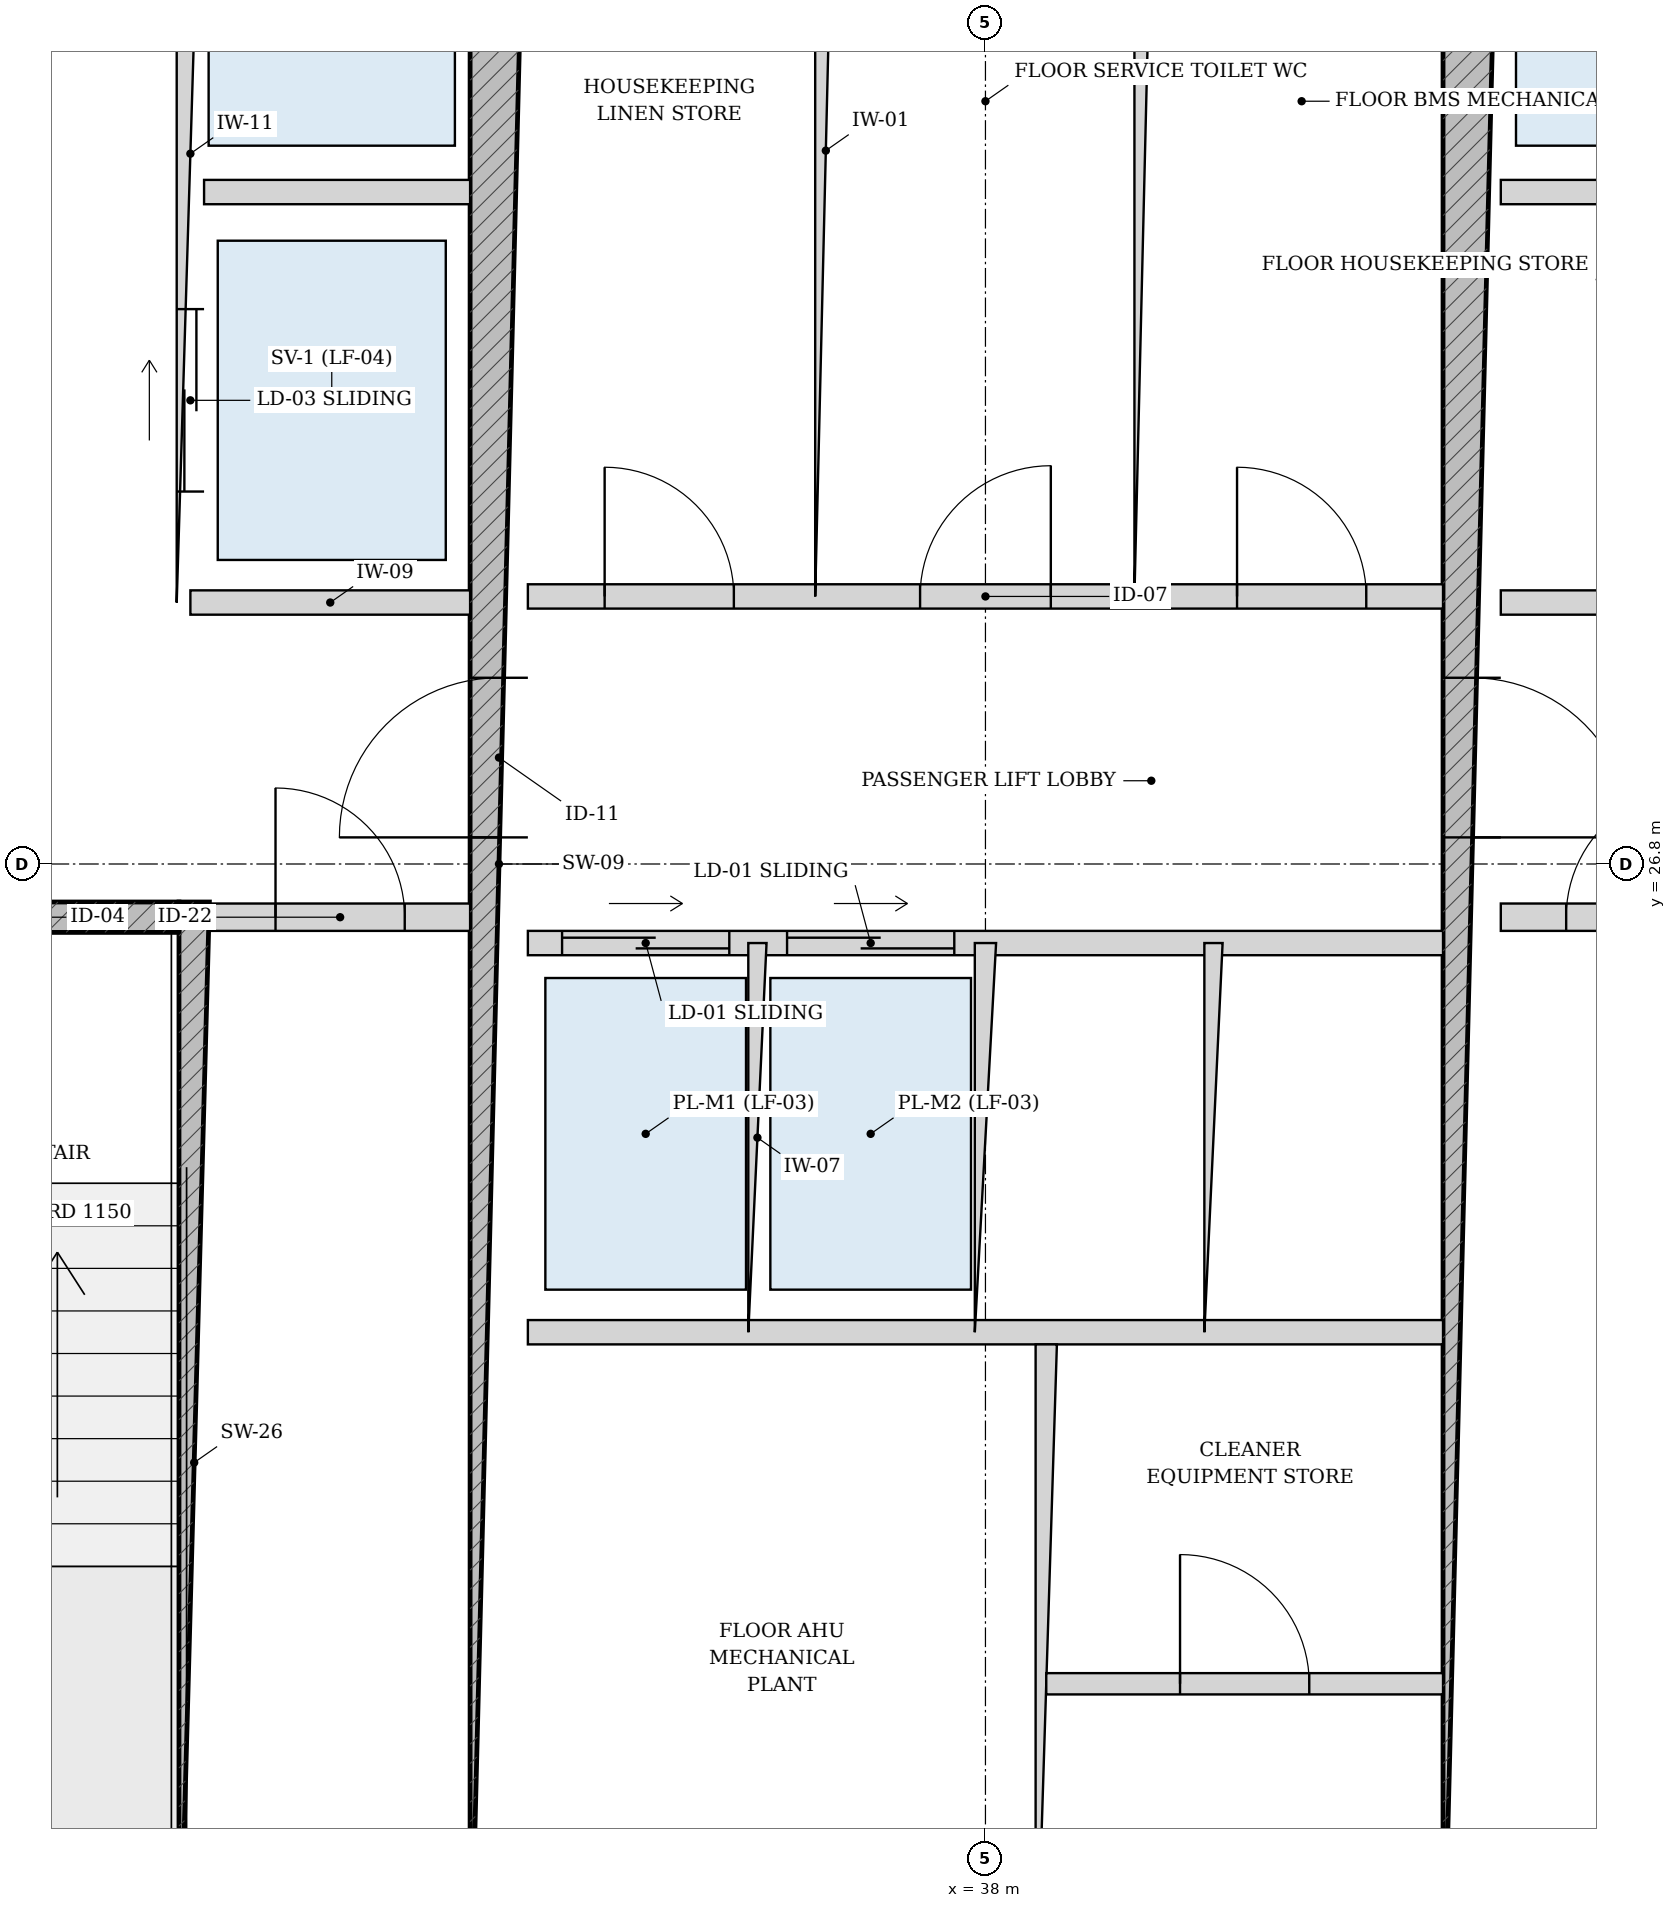
"""IFC4 building model, lengths in metres.
Left out: names, types, materials, properties, quantities, classifications, styles, units other than length and angle.
Written with IfcOpenShell. Run it as: python <this file> out.ifc"""

import sys

from ifc_helpers import new_model, si_unit, direction, frame, frame_2d, origin, place, context, subcontext, project, spatial, rectangle, extrude, source, transform, mapped, element, fill, save


model = new_model("IFC4")
c1 = context("Model", 3, precision=1e-05, world=origin(), true_north=direction((-0.2419218956, 0.970295726276)))
c2 = subcontext(c1, "Body", "Model", "MODEL_VIEW")
j1 = project(units=[si_unit("LENGTHUNIT", "METRE"), si_unit("PLANEANGLEUNIT", "RADIAN")], contexts=[c1])
p1 = place(None, origin())
s1 = spatial("IfcSite", under=j1, at=p1, CompositionType="ELEMENT")
p2 = place(p1, origin())
s2 = spatial("IfcBuilding", under=s1, at=p2, CompositionType="ELEMENT")
p3 = place(p2, frame((0.0, 0.0, 178.6)))
s3 = spatial("IfcBuildingStorey", under=s2, at=p3, CompositionType="ELEMENT", Elevation=178.6)
p4 = place(p3, frame((32.795, 19.175, 0.0), z_axis=(0.0, 0.0, 1.0), x_axis=(0.0, 1.0, 0.0)))
e1 = element("IfcWall", 1, at=p4, inside=s3, PredefinedType="SOLIDWALL", context=c2, shape_type="SweptSolid", body=[
    extrude(rectangle(XDim=7.375, YDim=0.2, at=frame_2d((3.688, 0.0))), origin(), (0.0, 0.0, 1.0), 3.33),
])
p5 = place(p3, frame((29.375, 26.45, 0.0), z_axis=(0.0, 0.0, 1.0), x_axis=(1.0, 0.0, 0.0)))
e2 = element("IfcWall", 2, at=p5, inside=s3, PredefinedType="SOLIDWALL", context=c2, shape_type="SweptSolid", body=[
    extrude(rectangle(XDim=3.32, YDim=0.2, at=frame_2d((1.66, 0.0))), origin(), (0.0, 0.0, 1.0), 3.33),
])
p6 = place(p5, frame((1.185, 0.0, 0.0)))
e3 = element("IfcOpeningElement", 3, at=p6, cuts=e2, PredefinedType="OPENING", context=c2, shape_type="SweptSolid", body=[
    extrude(rectangle(XDim=0.95, YDim=2.15, at=frame_2d((0.475, 1.075))), frame((0.0, 0.11, 0.0), z_axis=(0.0, -1.0, 0.0), x_axis=(1.0, 0.0, 0.0)), (0.0, 0.0, 1.0), 0.22),
])
p7 = place(p3, frame((34.8, 19.175, 0.0), z_axis=(0.0, 0.0, 1.0), x_axis=(0.0, 1.0, 0.0)))
e4 = element("IfcWall", 4, at=p7, inside=s3, PredefinedType="SHEAR", context=c2, shape_type="SweptSolid", body=[
    extrude(rectangle(XDim=15.25, YDim=0.38, at=frame_2d((7.625, 0.0))), origin(), (0.0, 0.0, 1.0), 3.33),
])
p8 = place(p7, frame((7.8, 0.0, 0.0)))
e5 = element("IfcOpeningElement", 5, at=p8, cuts=e4, PredefinedType="OPENING", context=c2, shape_type="SweptSolid", body=[
    extrude(rectangle(XDim=1.05, YDim=2.15, at=frame_2d((0.525, 1.075))), frame((0.0, 0.2, 0.0), z_axis=(0.0, -1.0, 0.0), x_axis=(1.0, 0.0, 0.0)), (0.0, 0.0, 1.0), 0.4),
])
p9 = place(p3, frame((41.2, 19.175, 0.0), z_axis=(0.0, 0.0, 1.0), x_axis=(0.0, 1.0, 0.0)))
e6 = element("IfcWall", 6, at=p9, inside=s3, PredefinedType="SHEAR", context=c2, shape_type="SweptSolid", body=[
    extrude(rectangle(XDim=15.25, YDim=0.38, at=frame_2d((7.625, 0.0))), origin(), (0.0, 0.0, 1.0), 3.33),
])
p10 = place(p9, frame((7.8, 0.0, 0.0)))
e7 = element("IfcOpeningElement", 7, at=p10, cuts=e6, PredefinedType="OPENING", context=c2, shape_type="SweptSolid", body=[
    extrude(rectangle(XDim=1.05, YDim=2.15, at=frame_2d((0.525, 1.075))), frame((0.0, 0.2, 0.0), z_axis=(0.0, -1.0, 0.0), x_axis=(1.0, 0.0, 0.0)), (0.0, 0.0, 1.0), 0.4),
])
p11 = place(p3, frame((32.9, 26.45, 0.0), z_axis=(0.0, 0.0, 1.0), x_axis=(1.0, 0.0, 0.0)))
e8 = element("IfcWall", 8, at=p11, inside=s3, PredefinedType="PARTITIONING", context=c2, shape_type="SweptSolid", body=[
    extrude(rectangle(XDim=1.71, YDim=0.18, at=frame_2d((0.855, 0.0))), origin(), (0.0, 0.0, 1.0), 3.33),
])
p12 = place(p11, frame((0.43, 0.0, 0.0)))
e9 = element("IfcOpeningElement", 9, at=p12, cuts=e8, PredefinedType="OPENING", context=c2, shape_type="SweptSolid", body=[
    extrude(rectangle(XDim=0.85, YDim=2.1, at=frame_2d((0.425, 1.05))), frame((0.0, 0.1, 0.0), z_axis=(0.0, -1.0, 0.0), x_axis=(1.0, 0.0, 0.0)), (0.0, 0.0, 1.0), 0.2),
])
p13 = place(p3, frame((41.39, 26.45, 0.0), z_axis=(0.0, 0.0, 1.0), x_axis=(1.0, 0.0, 0.0)))
e10 = element("IfcWall", 10, at=p13, inside=s3, PredefinedType="PARTITIONING", context=c2, shape_type="SweptSolid", body=[
    extrude(rectangle(XDim=1.71, YDim=0.18, at=frame_2d((0.855, 0.0))), origin(), (0.0, 0.0, 1.0), 3.33),
])
p14 = place(p13, frame((0.43, 0.0, 0.0)))
e11 = element("IfcOpeningElement", 11, at=p14, cuts=e10, PredefinedType="OPENING", context=c2, shape_type="SweptSolid", body=[
    extrude(rectangle(XDim=0.85, YDim=2.1, at=frame_2d((0.425, 1.05))), frame((0.0, 0.1, 0.0), z_axis=(0.0, -1.0, 0.0), x_axis=(1.0, 0.0, 0.0)), (0.0, 0.0, 1.0), 0.2),
])
p15 = place(p3, frame((32.77, 28.52, 0.0), z_axis=(0.0, 0.0, 1.0), x_axis=(0.0, 1.0, 0.0)))
e12 = element("IfcWall", 12, at=p15, inside=s3, PredefinedType="PARTITIONING", context=c2, shape_type="SweptSolid", body=[
    extrude(rectangle(XDim=5.905, YDim=0.18, at=frame_2d((2.953, 0.0))), origin(), (0.0, 0.0, 1.0), 3.33),
])
p16 = place(p15, frame((3.655, 0.0, 0.0)))
e13 = element("IfcOpeningElement", 13, at=p16, cuts=e12, PredefinedType="OPENING", context=c2, shape_type="SweptSolid", body=[
    extrude(rectangle(XDim=1.15, YDim=2.2, at=frame_2d((0.575, 1.1))), frame((0.0, 0.1, 0.0), z_axis=(0.0, -1.0, 0.0), x_axis=(1.0, 0.0, 0.0)), (0.0, 0.0, 1.0), 0.2),
])
p17 = place(p15, frame((0.73, 0.0, 0.0)))
e14 = element("IfcOpeningElement", 14, at=p17, cuts=e12, PredefinedType="OPENING", context=c2, shape_type="SweptSolid", body=[
    extrude(rectangle(XDim=1.2, YDim=2.25, at=frame_2d((0.6, 1.125))), frame((0.0, 0.1, 0.0), z_axis=(0.0, -1.0, 0.0), x_axis=(1.0, 0.0, 0.0)), (0.0, 0.0, 1.0), 0.2),
])
p18 = place(p3, frame((32.86, 31.22, 0.0), z_axis=(0.0, 0.0, 1.0), x_axis=(1.0, 0.0, 0.0)))
e15 = element("IfcWall", 15, at=p18, inside=s3, PredefinedType="PARTITIONING", context=c2, shape_type="SweptSolid", body=[
    extrude(rectangle(XDim=1.75, YDim=0.16, at=frame_2d((0.875, 0.0))), origin(), (0.0, 0.0, 1.0), 3.33),
])
p19 = place(p3, frame((32.77, 28.52, 0.0), z_axis=(0.0, 0.0, 1.0), x_axis=(1.0, 0.0, 0.0)))
e16 = element("IfcWall", 16, at=p19, inside=s3, PredefinedType="PARTITIONING", context=c2, shape_type="SweptSolid", body=[
    extrude(rectangle(XDim=1.84, YDim=0.16, at=frame_2d((0.92, 0.0))), origin(), (0.0, 0.0, 1.0), 3.33),
])
p20 = place(p3, frame((41.39, 31.22, 0.0), z_axis=(0.0, 0.0, 1.0), x_axis=(1.0, 0.0, 0.0)))
e17 = element("IfcWall", 17, at=p20, inside=s3, PredefinedType="PARTITIONING", context=c2, shape_type="SweptSolid", body=[
    extrude(rectangle(XDim=1.75, YDim=0.16, at=frame_2d((0.875, 0.0))), origin(), (0.0, 0.0, 1.0), 3.33),
])
p21 = place(p3, frame((41.39, 28.52, 0.0), z_axis=(0.0, 0.0, 1.0), x_axis=(1.0, 0.0, 0.0)))
e18 = element("IfcWall", 18, at=p21, inside=s3, PredefinedType="PARTITIONING", context=c2, shape_type="SweptSolid", body=[
    extrude(rectangle(XDim=1.84, YDim=0.16, at=frame_2d((0.92, 0.0))), origin(), (0.0, 0.0, 1.0), 3.33),
])
p22 = place(p3, frame((34.99, 28.56, 0.0), z_axis=(0.0, 0.0, 1.0), x_axis=(1.0, 0.0, 0.0)))
e19 = element("IfcWall", 19, at=p22, inside=s3, PredefinedType="PARTITIONING", context=c2, shape_type="SweptSolid", body=[
    extrude(rectangle(XDim=6.02, YDim=0.16, at=frame_2d((3.01, 0.0))), origin(), (0.0, 0.0, 1.0), 3.33),
])
p23 = place(p22, frame((0.505, 0.0, 0.0)))
e20 = element("IfcOpeningElement", 20, at=p23, cuts=e19, PredefinedType="OPENING", context=c2, shape_type="SweptSolid", body=[
    extrude(rectangle(XDim=0.85, YDim=2.1, at=frame_2d((0.425, 1.05))), frame((0.0, 0.09, 0.0), z_axis=(0.0, -1.0, 0.0), x_axis=(1.0, 0.0, 0.0)), (0.0, 0.0, 1.0), 0.18),
])
p24 = place(p22, frame((2.58, 0.0, 0.0)))
e21 = element("IfcOpeningElement", 21, at=p24, cuts=e19, PredefinedType="OPENING", context=c2, shape_type="SweptSolid", body=[
    extrude(rectangle(XDim=0.86, YDim=2.1, at=frame_2d((0.43, 1.05))), frame((0.0, 0.09, 0.0), z_axis=(0.0, -1.0, 0.0), x_axis=(1.0, 0.0, 0.0)), (0.0, 0.0, 1.0), 0.18),
])
p25 = place(p22, frame((4.665, 0.0, 0.0)))
e22 = element("IfcOpeningElement", 22, at=p25, cuts=e19, PredefinedType="OPENING", context=c2, shape_type="SweptSolid", body=[
    extrude(rectangle(XDim=0.85, YDim=2.1, at=frame_2d((0.425, 1.05))), frame((0.0, 0.09, 0.0), z_axis=(0.0, -1.0, 0.0), x_axis=(1.0, 0.0, 0.0)), (0.0, 0.0, 1.0), 0.18),
])
for number, where, z_axis, x_axis in (
    (23, (36.95, 28.56, 0.0), (0.0, 0.0, 1.0), (0.0, 1.0, 0.0)),
    (24, (39.05, 28.56, 0.0), (0.0, 0.0, 1.0), (0.0, 1.0, 0.0)),
):
    element("IfcWall", number, at=place(p3, frame(where, z_axis=z_axis, x_axis=x_axis)), inside=s3, PredefinedType="PARTITIONING", context=c2, shape_type="SweptSolid", body=[
        extrude(rectangle(XDim=5.865, YDim=0.14, at=frame_2d((2.933, 0.0))), origin(), (0.0, 0.0, 1.0), 3.33),
    ])
p26 = place(p3, frame((34.99, 26.28, 0.0), z_axis=(0.0, 0.0, 1.0), x_axis=(1.0, 0.0, 0.0)))
e25 = element("IfcWall", 25, at=p26, inside=s3, PredefinedType="PARTITIONING", context=c2, shape_type="SweptSolid", body=[
    extrude(rectangle(XDim=6.02, YDim=0.16, at=frame_2d((3.01, 0.0))), origin(), (0.0, 0.0, 1.0), 3.33),
])
p27 = place(p26, frame((0.225, 0.0, 0.0)))
e26 = element("IfcOpeningElement", 26, at=p27, cuts=e25, PredefinedType="OPENING", context=c2, shape_type="SweptSolid", body=[
    extrude(rectangle(XDim=1.1, YDim=2.2, at=frame_2d((0.55, 1.1))), frame((0.0, 0.09, 0.0), z_axis=(0.0, -1.0, 0.0), x_axis=(1.0, 0.0, 0.0)), (0.0, 0.0, 1.0), 0.18),
])
p28 = place(p26, frame((1.705, 0.0, 0.0)))
e27 = element("IfcOpeningElement", 27, at=p28, cuts=e25, PredefinedType="OPENING", context=c2, shape_type="SweptSolid", body=[
    extrude(rectangle(XDim=1.1, YDim=2.2, at=frame_2d((0.55, 1.1))), frame((0.0, 0.09, 0.0), z_axis=(0.0, -1.0, 0.0), x_axis=(1.0, 0.0, 0.0)), (0.0, 0.0, 1.0), 0.18),
])
p29 = place(p3, frame((34.99, 23.72, 0.0), z_axis=(0.0, 0.0, 1.0), x_axis=(1.0, 0.0, 0.0)))
e28 = element("IfcWall", 28, at=p29, inside=s3, PredefinedType="PARTITIONING", context=c2, shape_type="SweptSolid", body=[
    extrude(rectangle(XDim=6.02, YDim=0.16, at=frame_2d((3.01, 0.0))), origin(), (0.0, 0.0, 1.0), 3.33),
])
p30 = place(p3, frame((36.5, 23.72, 0.0), z_axis=(0.0, 0.0, 1.0), x_axis=(0.0, 1.0, 0.0)))
e29 = element("IfcWall", 29, at=p30, inside=s3, PredefinedType="PARTITIONING", context=c2, shape_type="SweptSolid", body=[
    extrude(rectangle(XDim=2.56, YDim=0.12, at=frame_2d((1.28, 0.0))), origin(), (0.0, 0.0, 1.0), 3.33),
])
p31 = place(p3, frame((38.0, 23.72, 0.0), z_axis=(0.0, 0.0, 1.0), x_axis=(0.0, 1.0, 0.0)))
e30 = element("IfcWall", 30, at=p31, inside=s3, PredefinedType="PARTITIONING", context=c2, shape_type="SweptSolid", body=[
    extrude(rectangle(XDim=2.56, YDim=0.14, at=frame_2d((1.28, 0.0))), origin(), (0.0, 0.0, 1.0), 3.33),
])
p32 = place(p3, frame((39.5, 23.72, 0.0), z_axis=(0.0, 0.0, 1.0), x_axis=(0.0, 1.0, 0.0)))
e31 = element("IfcWall", 31, at=p32, inside=s3, PredefinedType="PARTITIONING", context=c2, shape_type="SweptSolid", body=[
    extrude(rectangle(XDim=2.56, YDim=0.12, at=frame_2d((1.28, 0.0))), origin(), (0.0, 0.0, 1.0), 3.33),
])
p33 = place(p3, frame((38.4, 19.175, 0.0), z_axis=(0.0, 0.0, 1.0), x_axis=(0.0, 1.0, 0.0)))
e32 = element("IfcWall", 32, at=p33, inside=s3, PredefinedType="PARTITIONING", context=c2, shape_type="SweptSolid", body=[
    extrude(rectangle(XDim=4.465, YDim=0.14, at=frame_2d((2.232, 0.0))), origin(), (0.0, 0.0, 1.0), 3.33),
])
p34 = place(p3, frame((38.4, 21.407, 0.0), z_axis=(0.0, 0.0, 1.0), x_axis=(1.0, 0.0, 0.0)))
e33 = element("IfcWall", 33, at=p34, inside=s3, PredefinedType="PARTITIONING", context=c2, shape_type="SweptSolid", body=[
    extrude(rectangle(XDim=2.61, YDim=0.14, at=frame_2d((1.305, 0.0))), origin(), (0.0, 0.0, 1.0), 3.33),
])
p35 = place(p34, frame((0.88, 0.0, 0.0)))
e34 = element("IfcOpeningElement", 34, at=p35, cuts=e33, PredefinedType="OPENING", context=c2, shape_type="SweptSolid", body=[
    extrude(rectangle(XDim=0.85, YDim=2.1, at=frame_2d((0.425, 1.05))), frame((0.0, 0.08, 0.0), z_axis=(0.0, -1.0, 0.0), x_axis=(1.0, 0.0, 0.0)), (0.0, 0.0, 1.0), 0.16),
])
m1 = source(origin(), c2, "Body", "SweptSolid", [
    extrude(rectangle(XDim=1.05, YDim=2.15, at=frame_2d((0.525, 1.075))), frame((0.0, 0.025, 0.0), z_axis=(0.0, -1.0, 0.0), x_axis=(1.0, 0.0, 0.0)), (0.0, 0.0, 1.0), 0.05),
])
p36 = place(p8, origin())
e35 = element("IfcDoor", 35, at=p36, inside=s3, OperationType="SINGLE_SWING_LEFT", PredefinedType="DOOR", context=c2, shape_type="MappedRepresentation", body=[
    mapped(m1, transform((0.0, 0.0, 0.0), scale=1.0)),
])
fill(e5, e35)
p37 = place(p10, frame((1.05, 0.0, 0.0), z_axis=(0.0, 0.0, 1.0), x_axis=(-1.0, 0.0, 0.0)))
e36 = element("IfcDoor", 36, at=p37, inside=s3, OperationType="SINGLE_SWING_RIGHT", PredefinedType="DOOR", context=c2, shape_type="MappedRepresentation", body=[
    mapped(m1, transform((0.0, 0.0, 0.0), scale=1.0)),
])
fill(e7, e36)
m2 = source(origin(), c2, "Body", "SweptSolid", [
    extrude(rectangle(XDim=0.85, YDim=2.1, at=frame_2d((0.425, 1.05))), frame((0.0, 0.025, 0.0), z_axis=(0.0, -1.0, 0.0), x_axis=(1.0, 0.0, 0.0)), (0.0, 0.0, 1.0), 0.05),
])
p38 = place(p12, origin())
e37 = element("IfcDoor", 37, at=p38, inside=s3, OperationType="SINGLE_SWING_LEFT", PredefinedType="DOOR", context=c2, shape_type="MappedRepresentation", body=[
    mapped(m2, transform((0.0, 0.0, 0.0), scale=1.0)),
])
fill(e9, e37)
p39 = place(p14, origin())
e38 = element("IfcDoor", 38, at=p39, inside=s3, OperationType="SINGLE_SWING_RIGHT", PredefinedType="DOOR", context=c2, shape_type="MappedRepresentation", body=[
    mapped(m2, transform((0.0, 0.0, 0.0), scale=1.0)),
])
fill(e11, e38)
p40 = place(p23, origin())
e39 = element("IfcDoor", 39, at=p40, inside=s3, OperationType="SINGLE_SWING_LEFT", PredefinedType="DOOR", context=c2, shape_type="MappedRepresentation", body=[
    mapped(m2, transform((0.0, 0.0, 0.0), scale=1.0)),
])
fill(e20, e39)
m3 = source(origin(), c2, "Body", "SweptSolid", [
    extrude(rectangle(XDim=0.86, YDim=2.1, at=frame_2d((0.43, 1.05))), frame((0.0, 0.025, 0.0), z_axis=(0.0, -1.0, 0.0), x_axis=(1.0, 0.0, 0.0)), (0.0, 0.0, 1.0), 0.05),
])
p41 = place(p24, origin())
e40 = element("IfcDoor", 40, at=p41, inside=s3, OperationType="SINGLE_SWING_RIGHT", PredefinedType="DOOR", context=c2, shape_type="MappedRepresentation", body=[
    mapped(m3, transform((0.0, 0.0, 0.0), scale=1.0)),
])
fill(e21, e40)
p42 = place(p25, origin())
e41 = element("IfcDoor", 41, at=p42, inside=s3, OperationType="SINGLE_SWING_LEFT", PredefinedType="DOOR", context=c2, shape_type="MappedRepresentation", body=[
    mapped(m2, transform((0.0, 0.0, 0.0), scale=1.0)),
])
fill(e22, e41)
p43 = place(p35, origin())
e42 = element("IfcDoor", 42, at=p43, inside=s3, OperationType="SINGLE_SWING_LEFT", PredefinedType="DOOR", context=c2, shape_type="MappedRepresentation", body=[
    mapped(m2, transform((0.0, 0.0, 0.0), scale=1.0)),
])
fill(e34, e42)
m4 = source(origin(), c2, "Body", "SweptSolid", [
    extrude(rectangle(XDim=1.2, YDim=2.25, at=frame_2d((0.6, 1.125))), frame((0.0, 0.025, 0.0), z_axis=(0.0, -1.0, 0.0), x_axis=(1.0, 0.0, 0.0)), (0.0, 0.0, 1.0), 0.05),
])
p44 = place(p17, origin())
e43 = element("IfcDoor", 43, at=p44, inside=s3, OperationType="DOUBLE_DOOR_SLIDING", PredefinedType="DOOR", context=c2, shape_type="MappedRepresentation", body=[
    mapped(m4, transform((0.0, 0.0, 0.0), scale=1.0)),
])
fill(e14, e43)
m5 = source(origin(), c2, "Body", "SweptSolid", [
    extrude(rectangle(XDim=1.1, YDim=2.2, at=frame_2d((0.55, 1.1))), frame((0.0, 0.025, 0.0), z_axis=(0.0, -1.0, 0.0), x_axis=(1.0, 0.0, 0.0)), (0.0, 0.0, 1.0), 0.05),
])
p45 = place(p27, origin())
e44 = element("IfcDoor", 44, at=p45, inside=s3, OperationType="DOUBLE_DOOR_SLIDING", PredefinedType="DOOR", context=c2, shape_type="MappedRepresentation", body=[
    mapped(m5, transform((0.0, 0.0, 0.0), scale=1.0)),
])
fill(e26, e44)
p46 = place(p28, origin())
e45 = element("IfcDoor", 45, at=p46, inside=s3, OperationType="DOUBLE_DOOR_SLIDING", PredefinedType="DOOR", context=c2, shape_type="MappedRepresentation", body=[
    mapped(m5, transform((0.0, 0.0, 0.0), scale=1.0)),
])
fill(e27, e45)
save(model, sys.argv[1])
